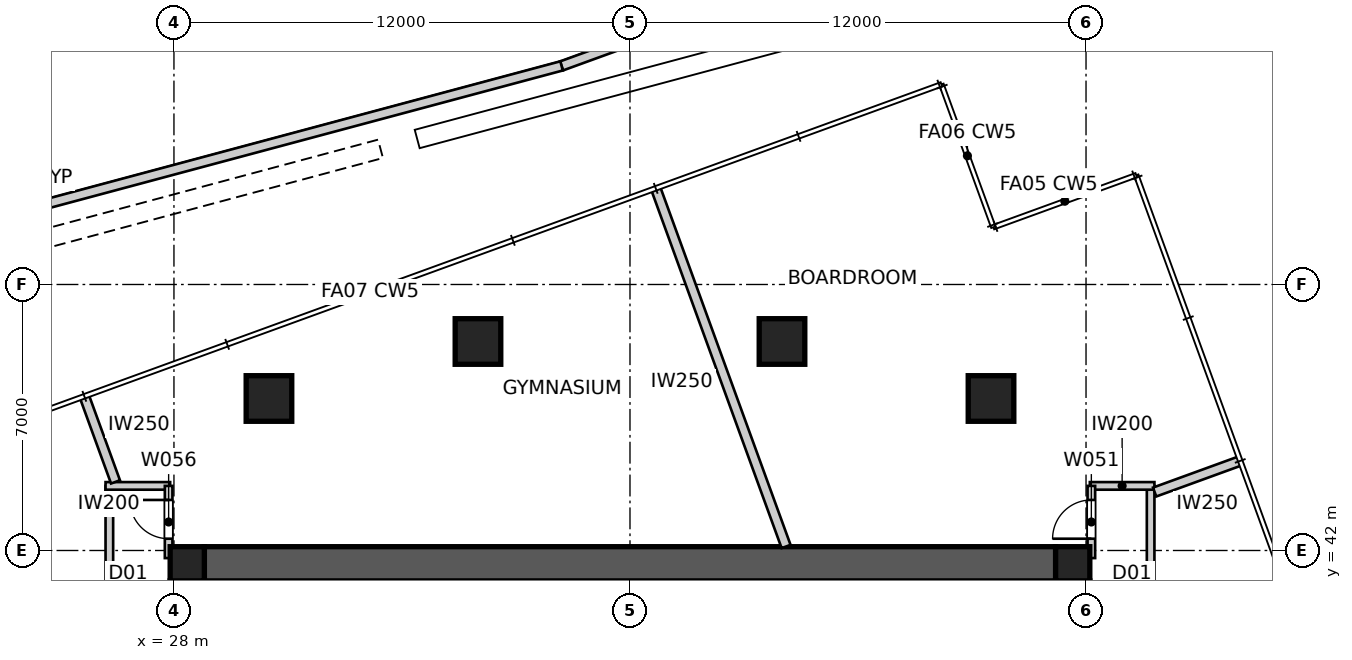
"""IFC4 building model, lengths in metres.
Left out: names, types, materials, properties, quantities, classifications, styles, units other than length and angle.
Written with IfcOpenShell. Run it as: python <this file> out.ifc"""

import sys

from ifc_helpers import new_model, si_unit, direction, frame, frame_2d, origin, origin_2d, place, context, subcontext, project, spatial, polyline, rectangle, outline, extrude, element, fill, save


model = new_model("IFC4")
c1 = context("Model", 3, precision=1e-05, world=origin(), true_north=direction((0.0, 1.0)))
c2 = subcontext(c1, "Body", "Model", "MODEL_VIEW")
j1 = project(units=[si_unit("LENGTHUNIT", "METRE"), si_unit("PLANEANGLEUNIT", "RADIAN")], contexts=[c1])
p1 = place(None, origin())
s1 = spatial("IfcSite", under=j1, at=p1, CompositionType="ELEMENT")
p2 = place(p1, origin())
s2 = spatial("IfcBuilding", under=s1, at=p2, CompositionType="ELEMENT")
p3 = place(p2, frame((0.0, 0.0, 138.8)))
s3 = spatial("IfcBuildingStorey", under=s2, at=p3, CompositionType="ELEMENT", Elevation=138.8)
p4 = place(p3, frame((28.8, 41.65, 0.0), z_axis=(0.0, 0.0, 1.0), x_axis=(1.0, 0.0, 0.0)))
e1 = element("IfcWall", 1, at=p4, inside=s3, PredefinedType="SHEAR", context=c2, shape_type="SweptSolid", body=[
    extrude(outline(polyline([(0.0, -0.45), (22.4, -0.45), (22.4, -0.025), (22.85, -0.025), (22.85, 0.025), (22.4, 0.025), (22.4, 0.45), (0.0, 0.45), (0.0, 0.025), (-0.45, 0.025), (-0.45, -0.025), (0.0, -0.025), (0.0, -0.45)])), origin(), (0.0, 0.0, 1.0), 5.0),
])
p5 = place(p3, frame((51.65, 18.8, 0.0), z_axis=(0.0, 0.0, 1.0), x_axis=(0.0, 1.0, 0.0)))
e2 = element("IfcWall", 2, at=p5, inside=s3, PredefinedType="SHEAR", context=c2, shape_type="SweptSolid", body=[
    extrude(outline(polyline([(0.0, -0.45), (22.4, -0.45), (22.4, -0.025), (22.85, -0.025), (22.85, 0.025), (22.4, 0.025), (22.4, 0.45), (0.0, 0.45), (0.0, 0.025), (-0.45, 0.025), (-0.45, -0.025), (0.0, -0.025), (0.0, -0.45)])), origin(), (0.0, 0.0, 1.0), 5.0),
])
p6 = place(p5, frame((11.14, 0.0, 0.0)))
e3 = element("IfcOpeningElement", 3, at=p6, cuts=e2, PredefinedType="OPENING", context=c2, shape_type="SweptSolid", body=[
    extrude(rectangle(XDim=1.02, YDim=2.4, at=frame_2d((0.51, 1.2))), frame((0.0, 0.46, 0.0), z_axis=(0.0, -1.0, 0.0), x_axis=(1.0, 0.0, 0.0)), (0.0, 0.0, 1.0), 0.92),
])
p7 = place(p3, frame((28.35, 41.2, 0.0), z_axis=(0.0, 0.0, 1.0), x_axis=(0.0, -1.0, 0.0)))
e4 = element("IfcWall", 4, at=p7, inside=s3, PredefinedType="SHEAR", context=c2, shape_type="SweptSolid", body=[
    extrude(outline(polyline([(0.0, -0.45), (22.4, -0.45), (22.4, -0.025), (22.85, -0.025), (22.85, 0.025), (22.4, 0.025), (22.4, 0.45), (0.0, 0.45), (0.0, 0.025), (-0.45, 0.025), (-0.45, -0.025), (0.0, -0.025), (0.0, -0.45)])), origin(), (0.0, 0.0, 1.0), 5.0),
])
p8 = place(p7, frame((11.14, 0.0, 0.0)))
e5 = element("IfcOpeningElement", 5, at=p8, cuts=e4, PredefinedType="OPENING", context=c2, shape_type="SweptSolid", body=[
    extrude(rectangle(XDim=1.02, YDim=2.4, at=frame_2d((0.51, 1.2))), frame((0.0, 0.46, 0.0), z_axis=(0.0, -1.0, 0.0), x_axis=(1.0, 0.0, 0.0)), (0.0, 0.0, 1.0), 0.92),
])
for number, where, z_axis, x_axis in (
    (6, (51.65, 41.65, 0.0), (0.0, 0.0, 1.0), (1.0, 0.0, 0.0)),
    (7, (28.35, 41.65, 0.0), (0.0, 0.0, 1.0), (1.0, 0.0, 0.0)),
):
    element("IfcColumn", number, at=place(p3, frame(where, z_axis=z_axis, x_axis=x_axis)), inside=s3, PredefinedType="COLUMN", context=c2, shape_type="SweptSolid", body=[
        extrude(rectangle(XDim=0.9, YDim=0.9, at=origin_2d()), origin(), (0.0, 0.0, 1.0), 5.0),
    ])
for number, where, z_axis, x_axis in (
    (8, (49.5, 46.0, 0.0), (0.0, 0.0, 1.0), (1.0, 0.0, 0.0)),
    (9, (44.0, 47.5, 0.0), (0.0, 0.0, 1.0), (1.0, 0.0, 0.0)),
    (10, (36.0, 47.5, 0.0), (0.0, 0.0, 1.0), (1.0, 0.0, 0.0)),
    (11, (30.5, 46.0, 0.0), (0.0, 0.0, 1.0), (1.0, 0.0, 0.0)),
):
    element("IfcColumn", number, at=place(p3, frame(where, z_axis=z_axis, x_axis=x_axis)), inside=s3, PredefinedType="COLUMN", context=c2, shape_type="SweptSolid", body=[
        extrude(rectangle(XDim=1.2, YDim=1.2, at=origin_2d()), origin(), (0.0, 0.0, 1.0), 5.0),
    ])
p9 = place(p3, frame((50.628, 59.276, -0.05), z_axis=(0.0, 0.0, 1.0), x_axis=(-0.939692601126, -0.342020197341, 0.0)))
e12 = element("IfcWall", 12, at=p9, inside=s3, PredefinedType="PARAPET", context=c2, shape_type="SweptSolid", body=[
    extrude(rectangle(XDim=13.226, YDim=0.25, at=frame_2d((6.613, 0.0))), origin(), (0.0, 0.0, 1.0), 1.15),
])
p10 = place(p3, frame((38.199, 54.752, -0.05), z_axis=(0.0, 0.0, 1.0), x_axis=(-0.965925409669, -0.258820599944, 0.0)))
e13 = element("IfcWall", 13, at=p10, inside=s3, PredefinedType="PARAPET", context=c2, shape_type="SweptSolid", body=[
    extrude(rectangle(XDim=29.167, YDim=0.25, at=frame_2d((14.583, 0.0))), origin(), (0.0, 0.0, 1.0), 1.15),
])
p11 = place(p3, frame((53.7, 16.3, 0.0), z_axis=(0.0, 0.0, 1.0), x_axis=(0.0, 1.0, 0.0)))
e14 = element("IfcWall", 14, at=p11, inside=s3, PredefinedType="PARTITIONING", context=c2, shape_type="SweptSolid", body=[
    extrude(rectangle(XDim=27.4, YDim=0.2, at=frame_2d((13.7, 0.0))), origin(), (0.0, 0.0, 1.0), 4.85),
])
p12 = place(p11, frame((18.075, 0.0, 0.0)))
e15 = element("IfcOpeningElement", 15, at=p12, cuts=e14, PredefinedType="OPENING", context=c2, shape_type="SweptSolid", body=[
    extrude(rectangle(XDim=1.02, YDim=2.34, at=frame_2d((0.51, 1.17))), frame((0.0, 0.11, 0.0), z_axis=(0.0, -1.0, 0.0), x_axis=(1.0, 0.0, 0.0)), (0.0, 0.0, 1.0), 0.22),
])
p13 = place(p11, frame((4.741, 0.0, 0.0)))
e16 = element("IfcOpeningElement", 16, at=p13, cuts=e14, PredefinedType="OPENING", context=c2, shape_type="SweptSolid", body=[
    extrude(rectangle(XDim=1.02, YDim=2.34, at=frame_2d((0.51, 1.17))), frame((0.0, 0.11, 0.0), z_axis=(0.0, -1.0, 0.0), x_axis=(1.0, 0.0, 0.0)), (0.0, 0.0, 1.0), 0.22),
])
p14 = place(p3, frame((52.1, 43.7, 0.0), z_axis=(0.0, 0.0, 1.0), x_axis=(1.0, 0.0, 0.0)))
e17 = element("IfcWall", 17, at=p14, inside=s3, PredefinedType="PARTITIONING", context=c2, shape_type="SweptSolid", body=[
    extrude(rectangle(XDim=1.7, YDim=0.2, at=frame_2d((0.85, 0.0))), origin(), (0.0, 0.0, 1.0), 4.85),
])
p15 = place(p3, frame((52.14, 41.8, 0.0), z_axis=(0.0, 0.0, 1.0), x_axis=(0.0, 1.0, 0.0)))
e18 = element("IfcWall", 18, at=p15, inside=s3, PredefinedType="PARTITIONING", context=c2, shape_type="SweptSolid", body=[
    extrude(rectangle(XDim=1.9, YDim=0.2, at=frame_2d((0.95, 0.0))), origin(), (0.0, 0.0, 1.0), 4.85),
])
p16 = place(p15, frame((0.51, 0.0, 0.0)))
e19 = element("IfcOpeningElement", 19, at=p16, cuts=e18, PredefinedType="OPENING", context=c2, shape_type="SweptSolid", body=[
    extrude(rectangle(XDim=1.02, YDim=2.34, at=frame_2d((0.51, 1.17))), frame((0.0, 0.11, 0.0), z_axis=(0.0, -1.0, 0.0), x_axis=(1.0, 0.0, 0.0)), (0.0, 0.0, 1.0), 0.22),
])
p17 = place(p3, frame((26.3, 16.3, 0.0), z_axis=(0.0, 0.0, 1.0), x_axis=(0.0, 1.0, 0.0)))
e20 = element("IfcWall", 20, at=p17, inside=s3, PredefinedType="PARTITIONING", context=c2, shape_type="SweptSolid", body=[
    extrude(rectangle(XDim=27.4, YDim=0.2, at=frame_2d((13.7, 0.0))), origin(), (0.0, 0.0, 1.0), 4.85),
])
p18 = place(p17, frame((21.639, 0.0, 0.0)))
e21 = element("IfcOpeningElement", 21, at=p18, cuts=e20, PredefinedType="OPENING", context=c2, shape_type="SweptSolid", body=[
    extrude(rectangle(XDim=1.02, YDim=2.34, at=frame_2d((0.51, 1.17))), frame((0.0, 0.11, 0.0), z_axis=(0.0, -1.0, 0.0), x_axis=(1.0, 0.0, 0.0)), (0.0, 0.0, 1.0), 0.22),
])
p19 = place(p17, frame((3.312, 0.0, 0.0)))
e22 = element("IfcOpeningElement", 22, at=p19, cuts=e20, PredefinedType="OPENING", context=c2, shape_type="SweptSolid", body=[
    extrude(rectangle(XDim=1.02, YDim=2.34, at=frame_2d((0.51, 1.17))), frame((0.0, 0.11, 0.0), z_axis=(0.0, -1.0, 0.0), x_axis=(1.0, 0.0, 0.0)), (0.0, 0.0, 1.0), 0.22),
])
p20 = place(p17, frame((9.341, 0.0, 0.0)))
e23 = element("IfcOpeningElement", 23, at=p20, cuts=e20, PredefinedType="OPENING", context=c2, shape_type="SweptSolid", body=[
    extrude(rectangle(XDim=1.02, YDim=2.34, at=frame_2d((0.51, 1.17))), frame((0.0, 0.11, 0.0), z_axis=(0.0, -1.0, 0.0), x_axis=(1.0, 0.0, 0.0)), (0.0, 0.0, 1.0), 0.22),
])
p21 = place(p17, frame((14.333, 0.0, 0.0)))
e24 = element("IfcOpeningElement", 24, at=p21, cuts=e20, PredefinedType="OPENING", context=c2, shape_type="SweptSolid", body=[
    extrude(rectangle(XDim=1.02, YDim=2.34, at=frame_2d((0.51, 1.17))), frame((0.0, 0.11, 0.0), z_axis=(0.0, -1.0, 0.0), x_axis=(1.0, 0.0, 0.0)), (0.0, 0.0, 1.0), 0.22),
])
p22 = place(p3, frame((27.9, 43.7, 0.0), z_axis=(0.0, 0.0, 1.0), x_axis=(-1.0, 0.0, 0.0)))
e25 = element("IfcWall", 25, at=p22, inside=s3, PredefinedType="PARTITIONING", context=c2, shape_type="SweptSolid", body=[
    extrude(rectangle(XDim=1.7, YDim=0.2, at=frame_2d((0.85, 0.0))), origin(), (0.0, 0.0, 1.0), 4.85),
])
p23 = place(p3, frame((27.86, 41.8, 0.0), z_axis=(0.0, 0.0, 1.0), x_axis=(0.0, 1.0, 0.0)))
e26 = element("IfcWall", 26, at=p23, inside=s3, PredefinedType="PARTITIONING", context=c2, shape_type="SweptSolid", body=[
    extrude(rectangle(XDim=1.9, YDim=0.2, at=frame_2d((0.95, 0.0))), origin(), (0.0, 0.0, 1.0), 4.85),
])
p24 = place(p23, frame((0.51, 0.0, 0.0)))
e27 = element("IfcOpeningElement", 27, at=p24, cuts=e26, PredefinedType="OPENING", context=c2, shape_type="SweptSolid", body=[
    extrude(rectangle(XDim=1.02, YDim=2.34, at=frame_2d((0.51, 1.17))), frame((0.0, 0.11, 0.0), z_axis=(0.0, -1.0, 0.0), x_axis=(1.0, 0.0, 0.0)), (0.0, 0.0, 1.0), 0.22),
])
p25 = place(p3, frame((56.058, 44.358, 0.0), z_axis=(0.0, 0.0, 1.0), x_axis=(-0.939692273186, -0.342021098348, 0.0)))
e28 = element("IfcWall", 28, at=p25, inside=s3, PredefinedType="PARTITIONING", context=c2, shape_type="SweptSolid", body=[
    extrude(rectangle(XDim=2.397, YDim=0.25, at=frame_2d((1.198, 0.0))), origin(), (0.0, 0.0, 1.0), 4.85),
])
p26 = place(p3, frame((40.677, 51.53, 0.0), z_axis=(0.0, 0.0, 1.0), x_axis=(0.342004948299, -0.939698151184, 0.0)))
e29 = element("IfcWall", 29, at=p26, inside=s3, PredefinedType="PARTITIONING", context=c2, shape_type="SweptSolid", body=[
    extrude(rectangle(XDim=10.03, YDim=0.25, at=frame_2d((5.015, 0.0))), origin(), (0.0, 0.0, 1.0), 4.85),
])
p27 = place(p3, frame((25.642, 46.058, 0.0), z_axis=(0.0, 0.0, 1.0), x_axis=(0.342021098348, -0.939692273186, 0.0)))
e30 = element("IfcWall", 30, at=p27, inside=s3, PredefinedType="PARTITIONING", context=c2, shape_type="SweptSolid", body=[
    extrude(rectangle(XDim=2.397, YDim=0.25, at=frame_2d((1.198, 0.0))), origin(), (0.0, 0.0, 1.0), 4.85),
])
p28 = place(p16, origin())
e31 = element("IfcDoor", 31, at=p28, inside=s3, OperationType="SINGLE_SWING_LEFT", PredefinedType="DOOR", context=c2, shape_type="SweptSolid", body=[
    extrude(rectangle(XDim=1.02, YDim=2.34, at=frame_2d((0.51, 1.17))), frame((0.0, 0.025, 0.0), z_axis=(0.0, -1.0, 0.0), x_axis=(1.0, 0.0, 0.0)), (0.0, 0.0, 1.0), 0.05),
])
fill(e19, e31)
p29 = place(p24, origin())
e32 = element("IfcDoor", 32, at=p29, inside=s3, OperationType="SINGLE_SWING_RIGHT", PredefinedType="DOOR", context=c2, shape_type="SweptSolid", body=[
    extrude(rectangle(XDim=1.02, YDim=2.34, at=frame_2d((0.51, 1.17))), frame((0.0, 0.025, 0.0), z_axis=(0.0, -1.0, 0.0), x_axis=(1.0, 0.0, 0.0)), (0.0, 0.0, 1.0), 0.05),
])
fill(e27, e32)
save(model, sys.argv[1])
